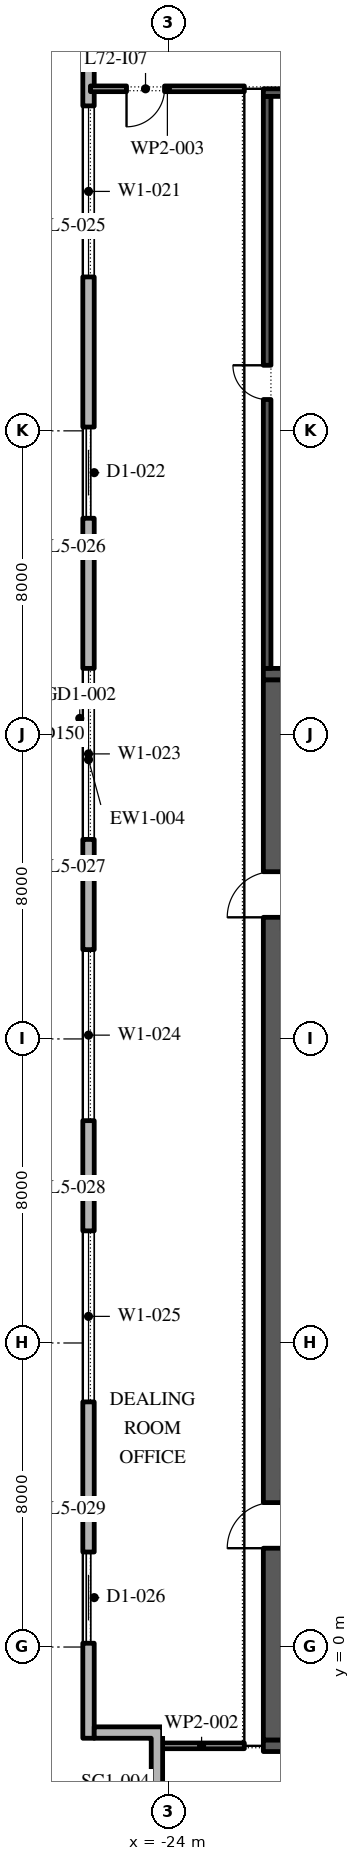
"""IFC4 building model, lengths in metres.
Left out: names, types, materials, properties, quantities, classifications, styles, units other than length and angle.
Written with IfcOpenShell. Run it as: python <this file> out.ifc"""

import sys

from ifc_helpers import new_model, si_unit, direction, frame, frame_2d, origin, place, context, subcontext, project, spatial, polyline, rectangle, outline, extrude, element, fill, save


model = new_model("IFC4")
c1 = context("Model", 3, precision=1e-05, world=origin(), true_north=direction((0.0, 1.0)))
c2 = subcontext(c1, "Body", "Model", "MODEL_VIEW")
j1 = project(units=[si_unit("LENGTHUNIT", "METRE"), si_unit("PLANEANGLEUNIT", "RADIAN")], contexts=[c1])
p1 = place(None, origin())
s1 = spatial("IfcSite", under=j1, at=p1, CompositionType="ELEMENT")
p2 = place(p1, origin())
s2 = spatial("IfcBuilding", under=s1, at=p2, CompositionType="ELEMENT")
p3 = place(p2, frame((0.0, 0.0, 330.0)))
s3 = spatial("IfcBuildingStorey", under=s2, at=p3, CompositionType="ELEMENT", Elevation=330.0)
p4 = place(p3, frame((-26.1, 49.1, 0.0), z_axis=(0.0, 0.0, 1.0), x_axis=(0.0, -1.0, 0.0)))
e1 = element("IfcWall", 1, at=p4, inside=s3, PredefinedType="STANDARD", context=c2, shape_type="SweptSolid", body=[
    extrude(rectangle(XDim=51.5, YDim=0.3, at=frame_2d((25.75, 0.0))), origin(), (0.0, 0.0, 1.0), 4.0),
])
p5 = place(p4, frame((1.3, 0.0, 0.45)))
e2 = element("IfcOpeningElement", 2, at=p5, cuts=e1, PredefinedType="OPENING", context=c2, shape_type="SweptSolid", body=[
    extrude(rectangle(XDim=4.5, YDim=3.05, at=frame_2d((2.25, 1.525))), frame((0.0, 0.16, 0.0), z_axis=(0.0, -1.0, 0.0), x_axis=(1.0, 0.0, 0.0)), (0.0, 0.0, 1.0), 0.32),
])
p6 = place(p4, frame((8.55, 0.0, 0.45)))
e3 = element("IfcOpeningElement", 3, at=p6, cuts=e1, PredefinedType="OPENING", context=c2, shape_type="SweptSolid", body=[
    extrude(rectangle(XDim=4.5, YDim=3.05, at=frame_2d((2.25, 1.525))), frame((0.0, 0.16, 0.0), z_axis=(0.0, -1.0, 0.0), x_axis=(1.0, 0.0, 0.0)), (0.0, 0.0, 1.0), 0.32),
])
p7 = place(p4, frame((17.0, 0.0, 0.0)))
e4 = element("IfcOpeningElement", 4, at=p7, cuts=e1, PredefinedType="OPENING", context=c2, shape_type="SweptSolid", body=[
    extrude(rectangle(XDim=2.4, YDim=3.5, at=frame_2d((1.2, 1.75))), frame((0.0, 0.16, 0.0), z_axis=(0.0, -1.0, 0.0), x_axis=(1.0, 0.0, 0.0)), (0.0, 0.0, 1.0), 0.32),
])
p8 = place(p4, frame((23.35, 0.0, 0.45)))
e5 = element("IfcOpeningElement", 5, at=p8, cuts=e1, PredefinedType="OPENING", context=c2, shape_type="SweptSolid", body=[
    extrude(rectangle(XDim=4.5, YDim=3.05, at=frame_2d((2.25, 1.525))), frame((0.0, 0.16, 0.0), z_axis=(0.0, -1.0, 0.0), x_axis=(1.0, 0.0, 0.0)), (0.0, 0.0, 1.0), 0.32),
])
p9 = place(p4, frame((30.75, 0.0, 0.45)))
e6 = element("IfcOpeningElement", 6, at=p9, cuts=e1, PredefinedType="OPENING", context=c2, shape_type="SweptSolid", body=[
    extrude(rectangle(XDim=4.5, YDim=3.05, at=frame_2d((2.25, 1.525))), frame((0.0, 0.16, 0.0), z_axis=(0.0, -1.0, 0.0), x_axis=(1.0, 0.0, 0.0)), (0.0, 0.0, 1.0), 0.32),
])
p10 = place(p4, frame((38.15, 0.0, 0.45)))
e7 = element("IfcOpeningElement", 7, at=p10, cuts=e1, PredefinedType="OPENING", context=c2, shape_type="SweptSolid", body=[
    extrude(rectangle(XDim=4.5, YDim=3.05, at=frame_2d((2.25, 1.525))), frame((0.0, 0.16, 0.0), z_axis=(0.0, -1.0, 0.0), x_axis=(1.0, 0.0, 0.0)), (0.0, 0.0, 1.0), 0.32),
])
p11 = place(p4, frame((46.6, 0.0, 0.0)))
e8 = element("IfcOpeningElement", 8, at=p11, cuts=e1, PredefinedType="OPENING", context=c2, shape_type="SweptSolid", body=[
    extrude(rectangle(XDim=2.4, YDim=3.5, at=frame_2d((1.2, 1.75))), frame((0.0, 0.16, 0.0), z_axis=(0.0, -1.0, 0.0), x_axis=(1.0, 0.0, 0.0)), (0.0, 0.0, 1.0), 0.32),
])
p12 = place(p3, origin())
e9 = element("IfcWall", 9, at=p12, inside=s3, PredefinedType="STANDARD", context=c2, shape_type="SweptSolid", body=[
    extrude(outline(polyline([(-22.65, -4.2), (-24.45, -4.2), (-24.45, -2.4), (-25.95, -2.4), (-25.95, -2.1), (-24.15, -2.1), (-24.15, -3.9), (-22.35, -3.9), (-22.35, -6.0), (-22.65, -6.0), (-22.65, -4.2)])), origin(), (0.0, 0.0, 1.0), 4.0),
])
p13 = place(p3, frame((-21.25, -2.45, 0.0), z_axis=(0.0, 0.0, 1.0), x_axis=(0.0, 1.0, 0.0)))
e10 = element("IfcWall", 10, at=p13, inside=s3, PredefinedType="SHEAR", context=c2, shape_type="SweptSolid", body=[
    extrude(rectangle(XDim=27.9, YDim=0.5, at=frame_2d((13.95, 0.0))), origin(), (0.0, 0.0, 1.0), 4.0),
])
p14 = place(p13, frame((5.05, 0.0, 0.0)))
e11 = element("IfcOpeningElement", 11, at=p14, cuts=e10, PredefinedType="OPENING", context=c2, shape_type="SweptSolid", body=[
    extrude(rectangle(XDim=1.2, YDim=2.1, at=frame_2d((0.6, 1.05))), frame((0.0, 0.26, 0.0), z_axis=(0.0, -1.0, 0.0), x_axis=(1.0, 0.0, 0.0)), (0.0, 0.0, 1.0), 0.52),
])
p15 = place(p13, frame((21.65, 0.0, 0.0)))
e12 = element("IfcOpeningElement", 12, at=p15, cuts=e10, PredefinedType="OPENING", context=c2, shape_type="SweptSolid", body=[
    extrude(rectangle(XDim=1.2, YDim=2.1, at=frame_2d((0.6, 1.05))), frame((0.0, 0.26, 0.0), z_axis=(0.0, -1.0, 0.0), x_axis=(1.0, 0.0, 0.0)), (0.0, 0.0, 1.0), 0.52),
])
for number, where, z_axis, x_axis in (
    (13, (-21.5, -2.6, 0.0), (0.0, 0.0, 1.0), (1.0, 0.0, 0.0)),
    (14, (-21.5, 25.6, 0.0), (0.0, 0.0, 1.0), (1.0, 0.0, 0.0)),
):
    element("IfcWall", number, at=place(p3, frame(where, z_axis=z_axis, x_axis=x_axis)), inside=s3, PredefinedType="SHEAR", context=c2, shape_type="SweptSolid", body=[
        extrude(rectangle(XDim=11.0, YDim=0.3, at=frame_2d((5.5, 0.0))), origin(), (0.0, 0.0, 1.0), 4.0),
    ])
p16 = place(p3, frame((-21.4, 25.75, 0.0), z_axis=(0.0, 0.0, 1.0), x_axis=(0.0, 1.0, 0.0)))
e15 = element("IfcWall", 15, at=p16, inside=s3, PredefinedType="SHEAR", context=c2, shape_type="SweptSolid", body=[
    extrude(rectangle(XDim=15.05, YDim=0.2, at=frame_2d((7.525, 0.0))), origin(), (0.0, 0.0, 1.0), 4.0),
])
p17 = place(p16, frame((7.075, 0.0, 0.0)))
e16 = element("IfcOpeningElement", 16, at=p17, cuts=e15, PredefinedType="OPENING", context=c2, shape_type="SweptSolid", body=[
    extrude(rectangle(XDim=0.9, YDim=2.1, at=frame_2d((0.45, 1.05))), frame((0.0, 0.11, 0.0), z_axis=(0.0, -1.0, 0.0), x_axis=(1.0, 0.0, 0.0)), (0.0, 0.0, 1.0), 0.22),
])
p18 = place(p3, frame((-21.5, 40.9, 0.0), z_axis=(0.0, 0.0, 1.0), x_axis=(1.0, 0.0, 0.0)))
e17 = element("IfcWall", 17, at=p18, inside=s3, PredefinedType="SHEAR", context=c2, shape_type="SweptSolid", body=[
    extrude(rectangle(XDim=11.0, YDim=0.2, at=frame_2d((5.5, 0.0))), origin(), (0.0, 0.0, 1.0), 4.0),
])
p19 = place(p3, frame((-24.25, -2.6, 0.0), z_axis=(0.0, 0.0, 1.0), x_axis=(1.0, 0.0, 0.0)))
e18 = element("IfcWall", 18, at=p19, inside=s3, PredefinedType="PARTITIONING", context=c2, shape_type="SweptSolid", body=[
    extrude(rectangle(XDim=2.25, YDim=0.15, at=frame_2d((1.125, 0.0))), origin(), (0.0, 0.0, 1.0), 4.0),
])
p20 = place(p3, frame((-22.0, 41.0, 0.0), z_axis=(0.0, 0.0, 1.0), x_axis=(-1.0, 0.0, 0.0)))
e19 = element("IfcWall", 19, at=p20, inside=s3, PredefinedType="PARTITIONING", context=c2, shape_type="SweptSolid", body=[
    extrude(rectangle(XDim=4.05, YDim=0.15, at=frame_2d((2.025, 0.0))), origin(), (0.0, 0.0, 1.0), 4.0),
])
p21 = place(p20, frame((2.1, 0.0, 0.0)))
e20 = element("IfcOpeningElement", 20, at=p21, cuts=e19, PredefinedType="OPENING", context=c2, shape_type="SweptSolid", body=[
    extrude(rectangle(XDim=1.0, YDim=2.1, at=frame_2d((0.5, 1.05))), frame((0.0, 0.085, 0.0), z_axis=(0.0, -1.0, 0.0), x_axis=(1.0, 0.0, 0.0)), (0.0, 0.0, 1.0), 0.17),
])
p22 = place(p6, origin())
e21 = element("IfcWindow", 21, at=p22, inside=s3, PartitioningType="DOUBLE_PANEL_VERTICAL", PredefinedType="WINDOW", context=c2, shape_type="SweptSolid", body=[
    extrude(rectangle(XDim=4.5, YDim=3.05, at=frame_2d((2.25, 1.525))), frame((0.0, 0.03, 0.0), z_axis=(0.0, -1.0, 0.0), x_axis=(1.0, 0.0, 0.0)), (0.0, 0.0, 1.0), 0.06),
])
fill(e3, e21)
p23 = place(p7, origin())
e22 = element("IfcDoor", 22, at=p23, inside=s3, OperationType="DOUBLE_DOOR_SLIDING", PredefinedType="DOOR", context=c2, shape_type="SweptSolid", body=[
    extrude(rectangle(XDim=2.4, YDim=3.5, at=frame_2d((1.2, 1.75))), frame((0.0, 0.025, 0.0), z_axis=(0.0, -1.0, 0.0), x_axis=(1.0, 0.0, 0.0)), (0.0, 0.0, 1.0), 0.05),
])
fill(e4, e22)
p24 = place(p8, origin())
e23 = element("IfcWindow", 23, at=p24, inside=s3, PartitioningType="DOUBLE_PANEL_VERTICAL", PredefinedType="WINDOW", context=c2, shape_type="SweptSolid", body=[
    extrude(rectangle(XDim=4.5, YDim=3.05, at=frame_2d((2.25, 1.525))), frame((0.0, 0.03, 0.0), z_axis=(0.0, -1.0, 0.0), x_axis=(1.0, 0.0, 0.0)), (0.0, 0.0, 1.0), 0.06),
])
fill(e5, e23)
p25 = place(p9, origin())
e24 = element("IfcWindow", 24, at=p25, inside=s3, PartitioningType="DOUBLE_PANEL_VERTICAL", PredefinedType="WINDOW", context=c2, shape_type="SweptSolid", body=[
    extrude(rectangle(XDim=4.5, YDim=3.05, at=frame_2d((2.25, 1.525))), frame((0.0, 0.03, 0.0), z_axis=(0.0, -1.0, 0.0), x_axis=(1.0, 0.0, 0.0)), (0.0, 0.0, 1.0), 0.06),
])
fill(e6, e24)
p26 = place(p10, origin())
e25 = element("IfcWindow", 25, at=p26, inside=s3, PartitioningType="DOUBLE_PANEL_VERTICAL", PredefinedType="WINDOW", context=c2, shape_type="SweptSolid", body=[
    extrude(rectangle(XDim=4.5, YDim=3.05, at=frame_2d((2.25, 1.525))), frame((0.0, 0.03, 0.0), z_axis=(0.0, -1.0, 0.0), x_axis=(1.0, 0.0, 0.0)), (0.0, 0.0, 1.0), 0.06),
])
fill(e7, e25)
p27 = place(p11, origin())
e26 = element("IfcDoor", 26, at=p27, inside=s3, OperationType="DOUBLE_DOOR_SLIDING", PredefinedType="DOOR", context=c2, shape_type="SweptSolid", body=[
    extrude(rectangle(XDim=2.4, YDim=3.5, at=frame_2d((1.2, 1.75))), frame((0.0, 0.025, 0.0), z_axis=(0.0, -1.0, 0.0), x_axis=(1.0, 0.0, 0.0)), (0.0, 0.0, 1.0), 0.05),
])
fill(e8, e26)
p28 = place(p14, origin())
e27 = element("IfcDoor", 27, at=p28, inside=s3, OperationType="SINGLE_SWING_RIGHT", PredefinedType="DOOR", context=c2, shape_type="SweptSolid", body=[
    extrude(rectangle(XDim=1.2, YDim=2.1, at=frame_2d((0.6, 1.05))), frame((0.0, 0.025, 0.0), z_axis=(0.0, -1.0, 0.0), x_axis=(1.0, 0.0, 0.0)), (0.0, 0.0, 1.0), 0.05),
])
fill(e11, e27)
p29 = place(p15, origin())
e28 = element("IfcDoor", 28, at=p29, inside=s3, OperationType="SINGLE_SWING_RIGHT", PredefinedType="DOOR", context=c2, shape_type="SweptSolid", body=[
    extrude(rectangle(XDim=1.2, YDim=2.1, at=frame_2d((0.6, 1.05))), frame((0.0, 0.025, 0.0), z_axis=(0.0, -1.0, 0.0), x_axis=(1.0, 0.0, 0.0)), (0.0, 0.0, 1.0), 0.05),
])
fill(e12, e28)
p30 = place(p17, origin())
e29 = element("IfcDoor", 29, at=p30, inside=s3, OperationType="SINGLE_SWING_LEFT", PredefinedType="DOOR", context=c2, shape_type="SweptSolid", body=[
    extrude(rectangle(XDim=0.9, YDim=2.1, at=frame_2d((0.45, 1.05))), frame((0.0, -0.05, 0.0), z_axis=(0.0, -1.0, 0.0), x_axis=(1.0, 0.0, 0.0)), (0.0, 0.0, 1.0), 0.05),
])
fill(e16, e29)
p31 = place(p21, origin())
e30 = element("IfcDoor", 30, at=p31, inside=s3, OperationType="SINGLE_SWING_LEFT", PredefinedType="DOOR", context=c2, shape_type="SweptSolid", body=[
    extrude(rectangle(XDim=1.0, YDim=2.1, at=frame_2d((0.5, 1.05))), frame((0.0, 0.025, 0.0), z_axis=(0.0, -1.0, 0.0), x_axis=(1.0, 0.0, 0.0)), (0.0, 0.0, 1.0), 0.05),
])
fill(e20, e30)
save(model, sys.argv[1])
